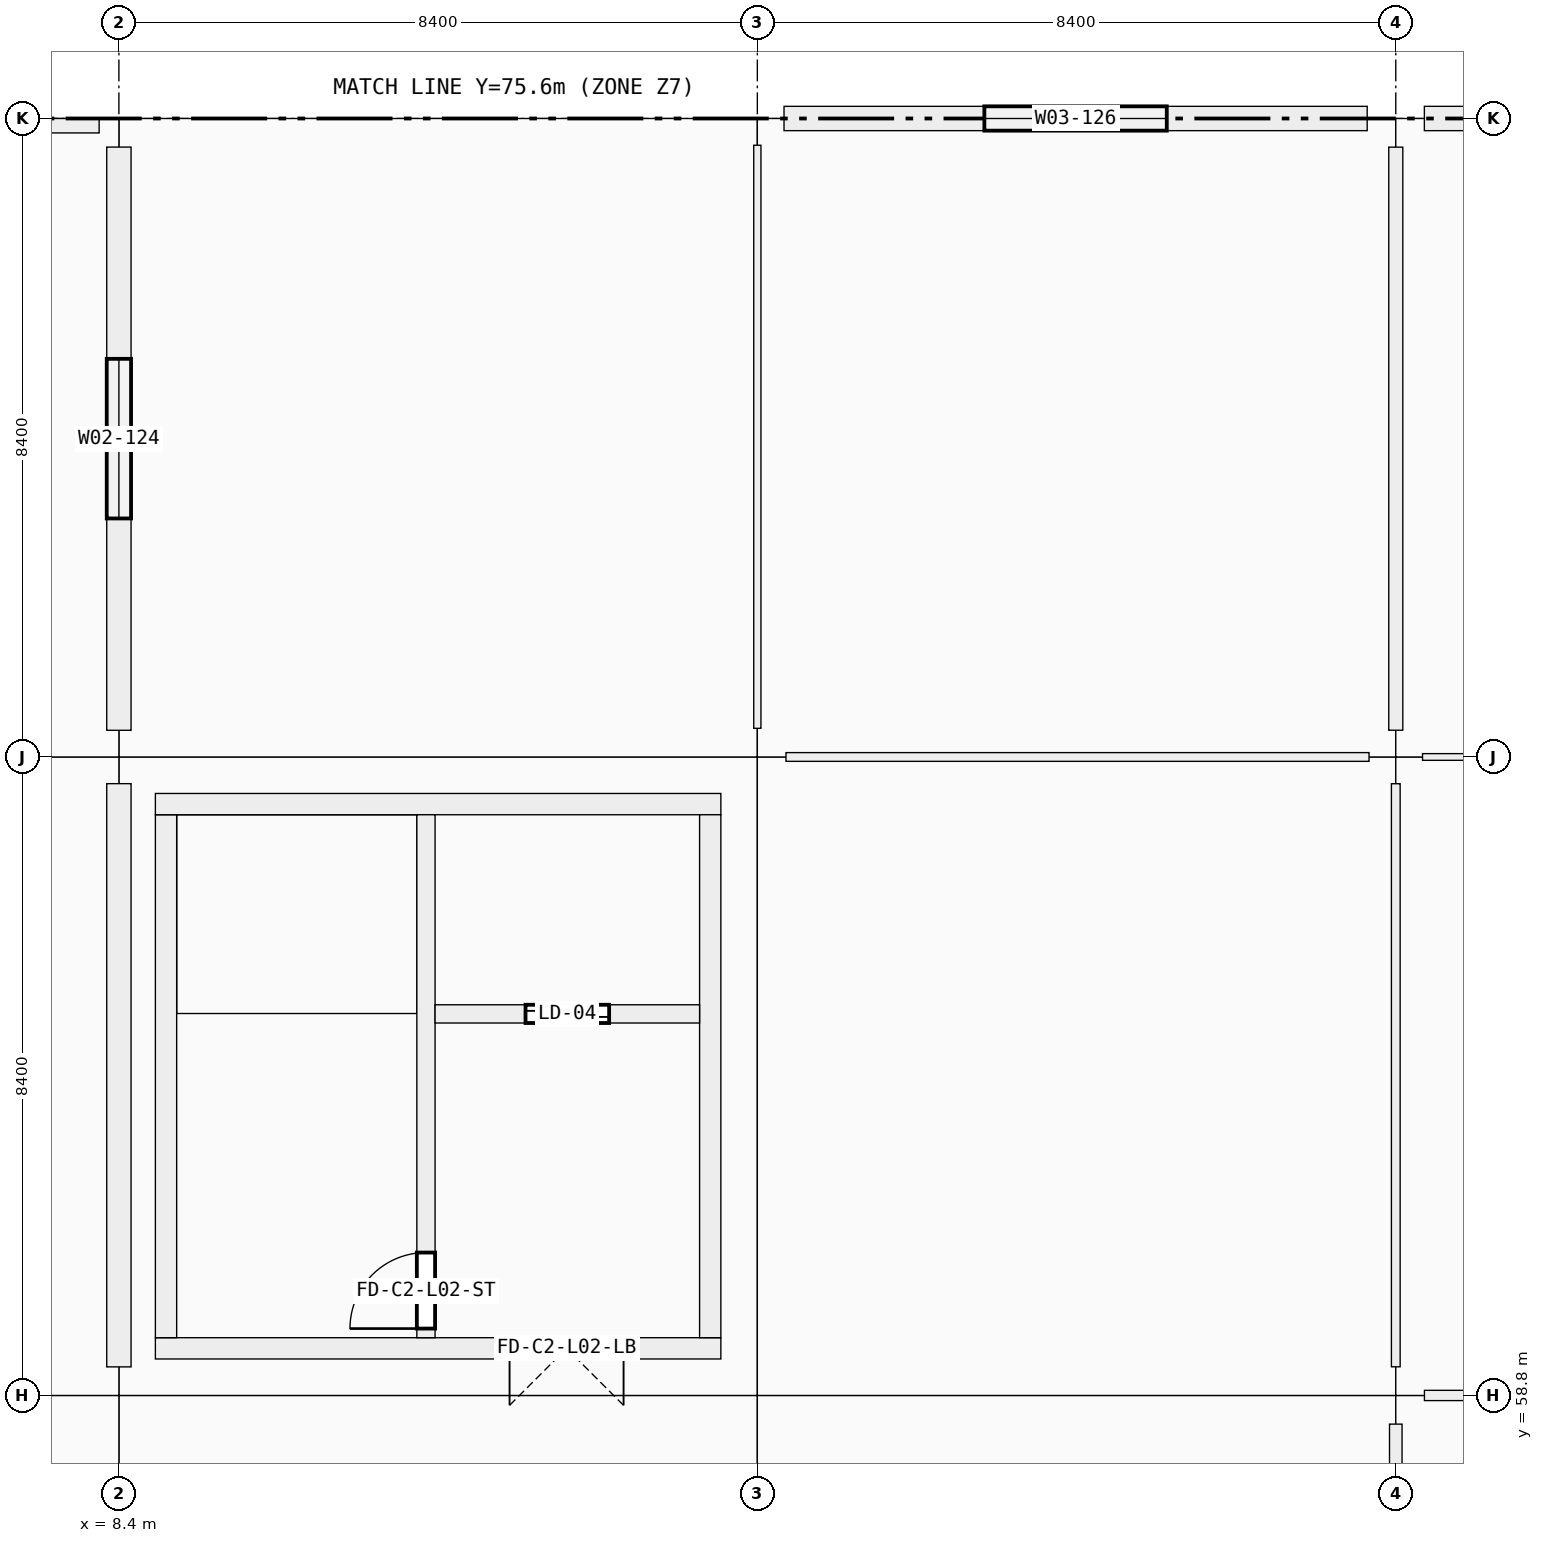
"""IFC4 building model, lengths in metres.
Left out: names, types, materials, properties, quantities, classifications, styles, units other than length and angle.
Written with IfcOpenShell. Run it as: python <this file> out.ifc"""

import sys

from ifc_helpers import new_model, si_unit, direction, frame, frame_2d, origin, origin_2d, place, context, subcontext, project, spatial, rectangle, extrude, element, fill, save


model = new_model("IFC4")
c1 = context("Model", 3, precision=1e-05, world=origin(), true_north=direction((0.0, 1.0)))
c2 = subcontext(c1, "Body", "Model", "MODEL_VIEW")
j1 = project(units=[si_unit("LENGTHUNIT", "METRE"), si_unit("PLANEANGLEUNIT", "RADIAN")], contexts=[c1])
p1 = place(None, origin())
s1 = spatial("IfcSite", under=j1, at=p1, CompositionType="ELEMENT")
p2 = place(p1, origin())
s2 = spatial("IfcBuilding", under=s1, at=p2, CompositionType="ELEMENT")
p3 = place(p2, frame((0.0, 0.0, 10.26)))
s3 = spatial("IfcBuildingStorey", under=s2, at=p3, CompositionType="ELEMENT", Elevation=10.26)
p4 = place(p3, frame((8.4, 58.8, 0.0), z_axis=(0.0, 0.0, 1.0), x_axis=(1.0, 0.0, 0.0)))
e1 = element("IfcColumn", 1, at=p4, inside=s3, PredefinedType="COLUMN", context=c2, shape_type="SweptSolid", body=[
    extrude(rectangle(XDim=0.75, YDim=0.75, at=origin_2d()), origin(), (0.0, 0.0, 1.0), 4.5),
])
p5 = place(p3, frame((8.4, 67.2, 0.0), z_axis=(0.0, 0.0, 1.0), x_axis=(1.0, 0.0, 0.0)))
e2 = element("IfcColumn", 2, at=p5, inside=s3, PredefinedType="COLUMN", context=c2, shape_type="SweptSolid", body=[
    extrude(rectangle(XDim=0.7, YDim=0.7, at=origin_2d()), origin(), (0.0, 0.0, 1.0), 4.5),
])
p6 = place(p3, frame((8.4, 75.6, 0.0), z_axis=(0.0, 0.0, 1.0), x_axis=(1.0, 0.0, 0.0)))
e3 = element("IfcColumn", 3, at=p6, inside=s3, PredefinedType="COLUMN", context=c2, shape_type="SweptSolid", body=[
    extrude(rectangle(XDim=0.75, YDim=0.75, at=origin_2d()), origin(), (0.0, 0.0, 1.0), 4.5),
])
p7 = place(p3, frame((16.8, 58.8, 0.0), z_axis=(0.0, 0.0, 1.0), x_axis=(1.0, 0.0, 0.0)))
e4 = element("IfcColumn", 4, at=p7, inside=s3, PredefinedType="COLUMN", context=c2, shape_type="SweptSolid", body=[
    extrude(rectangle(XDim=0.7, YDim=0.7, at=origin_2d()), origin(), (0.0, 0.0, 1.0), 4.5),
])
p8 = place(p3, frame((16.8, 67.2, 0.0), z_axis=(0.0, 0.0, 1.0), x_axis=(1.0, 0.0, 0.0)))
e5 = element("IfcColumn", 5, at=p8, inside=s3, PredefinedType="COLUMN", context=c2, shape_type="SweptSolid", body=[
    extrude(rectangle(XDim=0.75, YDim=0.75, at=origin_2d()), origin(), (0.0, 0.0, 1.0), 4.5),
])
p9 = place(p3, frame((16.8, 75.6, 0.0), z_axis=(0.0, 0.0, 1.0), x_axis=(1.0, 0.0, 0.0)))
e6 = element("IfcColumn", 6, at=p9, inside=s3, PredefinedType="COLUMN", context=c2, shape_type="SweptSolid", body=[
    extrude(rectangle(XDim=0.7, YDim=0.7, at=origin_2d()), origin(), (0.0, 0.0, 1.0), 4.5),
])
p10 = place(p3, frame((25.2, 58.8, 0.0), z_axis=(0.0, 0.0, 1.0), x_axis=(1.0, 0.0, 0.0)))
e7 = element("IfcColumn", 7, at=p10, inside=s3, PredefinedType="COLUMN", context=c2, shape_type="SweptSolid", body=[
    extrude(rectangle(XDim=0.75, YDim=0.75, at=origin_2d()), origin(), (0.0, 0.0, 1.0), 4.5),
])
p11 = place(p3, frame((25.2, 67.2, 0.0), z_axis=(0.0, 0.0, 1.0), x_axis=(1.0, 0.0, 0.0)))
e8 = element("IfcColumn", 8, at=p11, inside=s3, PredefinedType="COLUMN", context=c2, shape_type="SweptSolid", body=[
    extrude(rectangle(XDim=0.7, YDim=0.7, at=origin_2d()), origin(), (0.0, 0.0, 1.0), 4.5),
])
p12 = place(p3, frame((25.2, 75.6, 0.0), z_axis=(0.0, 0.0, 1.0), x_axis=(1.0, 0.0, 0.0)))
e9 = element("IfcColumn", 9, at=p12, inside=s3, PredefinedType="COLUMN", context=c2, shape_type="SweptSolid", body=[
    extrude(rectangle(XDim=0.75, YDim=0.75, at=origin_2d()), origin(), (0.0, 0.0, 1.0), 4.5),
])
p13 = place(p3, frame((8.4, 59.176, 0.0), z_axis=(0.0, 0.0, 1.0), x_axis=(0.0, 1.0, 0.0)))
e10 = element("IfcWall", 10, at=p13, inside=s3, PredefinedType="SOLIDWALL", context=c2, shape_type="SweptSolid", body=[
    extrude(rectangle(XDim=7.673, YDim=0.32, at=frame_2d((3.836, 0.0))), origin(), (0.0, 0.0, 1.0), 3.54),
])
p14 = place(p3, frame((8.4, 67.551, 0.0), z_axis=(0.0, 0.0, 1.0), x_axis=(0.0, 1.0, 0.0)))
e11 = element("IfcWall", 11, at=p14, inside=s3, PredefinedType="SOLIDWALL", context=c2, shape_type="SweptSolid", body=[
    extrude(rectangle(XDim=7.673, YDim=0.32, at=frame_2d((3.836, 0.0))), origin(), (0.0, 0.0, 1.0), 3.54),
])
p15 = place(p14, frame((2.787, 0.0, 0.9)))
e12 = element("IfcOpeningElement", 12, at=p15, cuts=e11, PredefinedType="OPENING", context=c2, shape_type="SweptSolid", body=[
    extrude(rectangle(XDim=2.1, YDim=1.8, at=frame_2d((1.05, 0.9))), frame((0.0, 0.16, 0.0), z_axis=(0.0, -1.0, 0.0), x_axis=(1.0, 0.0, 0.0)), (0.0, 0.0, 1.0), 0.32),
])
p16 = place(p3, frame((17.151, 75.6, 0.0), z_axis=(0.0, 0.0, 1.0), x_axis=(1.0, 0.0, 0.0)))
e13 = element("IfcWall", 13, at=p16, inside=s3, PredefinedType="SOLIDWALL", context=c2, shape_type="SweptSolid", body=[
    extrude(rectangle(XDim=7.673, YDim=0.32, at=frame_2d((3.836, 0.0))), origin(), (0.0, 0.0, 1.0), 3.54),
])
p17 = place(p16, frame((2.636, 0.0, 0.9)))
e14 = element("IfcOpeningElement", 14, at=p17, cuts=e13, PredefinedType="OPENING", context=c2, shape_type="SweptSolid", body=[
    extrude(rectangle(XDim=2.4, YDim=1.8, at=frame_2d((1.2, 0.9))), frame((0.0, 0.16, 0.0), z_axis=(0.0, -1.0, 0.0), x_axis=(1.0, 0.0, 0.0)), (0.0, 0.0, 1.0), 0.32),
])
p18 = place(p3, frame((25.576, 75.6, 0.0), z_axis=(0.0, 0.0, 1.0), x_axis=(1.0, 0.0, 0.0)))
e15 = element("IfcWall", 15, at=p18, inside=s3, PredefinedType="SOLIDWALL", context=c2, shape_type="SweptSolid", body=[
    extrude(rectangle(XDim=7.673, YDim=0.32, at=frame_2d((3.836, 0.0))), origin(), (0.0, 0.0, 1.0), 3.54),
])
p19 = place(p18, frame((2.337, 0.0, 0.9)))
e16 = element("IfcOpeningElement", 16, at=p19, cuts=e15, PredefinedType="OPENING", context=c2, shape_type="SweptSolid", body=[
    extrude(rectangle(XDim=3.0, YDim=1.2, at=frame_2d((1.5, 0.6))), frame((0.0, 0.16, 0.0), z_axis=(0.0, -1.0, 0.0), x_axis=(1.0, 0.0, 0.0)), (0.0, 0.0, 1.0), 0.32),
])
p20 = place(p3, frame((0.26, 75.505, 0.0), z_axis=(0.0, 0.0, 1.0), x_axis=(1.0, 0.0, 0.0)))
e17 = element("IfcWall", 17, at=p20, inside=s3, PredefinedType="PARAPET", context=c2, shape_type="SweptSolid", body=[
    extrude(rectangle(XDim=7.88, YDim=0.19, at=frame_2d((3.94, 0.0))), origin(), (0.0, 0.0, 1.0), 0.95),
])
p21 = place(p3, frame((16.32, 59.42, 0.0), z_axis=(0.0, 0.0, 1.0), x_axis=(-1.0, 0.0, 0.0)))
e18 = element("IfcWall", 18, at=p21, inside=s3, PredefinedType="SHEAR", context=c2, shape_type="SweptSolid", body=[
    extrude(rectangle(XDim=7.44, YDim=0.28, at=frame_2d((3.72, 0.0))), origin(), (0.0, 0.0, 1.0), 4.5),
])
p22 = place(p21, frame((1.28, 0.0, 0.0)))
e19 = element("IfcOpeningElement", 19, at=p22, cuts=e18, PredefinedType="OPENING", context=c2, shape_type="SweptSolid", body=[
    extrude(rectangle(XDim=1.5, YDim=2.15, at=frame_2d((0.75, 1.075))), frame((0.0, 0.14, 0.0), z_axis=(0.0, -1.0, 0.0), x_axis=(1.0, 0.0, 0.0)), (0.0, 0.0, 1.0), 0.28),
])
p23 = place(p3, frame((9.02, 59.56, 0.0), z_axis=(0.0, 0.0, 1.0), x_axis=(0.0, 1.0, 0.0)))
e20 = element("IfcWall", 20, at=p23, inside=s3, PredefinedType="SHEAR", context=c2, shape_type="SweptSolid", body=[
    extrude(rectangle(XDim=6.88, YDim=0.28, at=frame_2d((3.44, 0.0))), origin(), (0.0, 0.0, 1.0), 4.5),
])
p24 = place(p3, frame((8.88, 66.58, 0.0), z_axis=(0.0, 0.0, 1.0), x_axis=(1.0, 0.0, 0.0)))
e21 = element("IfcWall", 21, at=p24, inside=s3, PredefinedType="SHEAR", context=c2, shape_type="SweptSolid", body=[
    extrude(rectangle(XDim=7.44, YDim=0.28, at=frame_2d((3.72, 0.0))), origin(), (0.0, 0.0, 1.0), 4.5),
])
p25 = place(p3, frame((16.18, 66.44, 0.0), z_axis=(0.0, 0.0, 1.0), x_axis=(0.0, -1.0, 0.0)))
e22 = element("IfcWall", 22, at=p25, inside=s3, PredefinedType="SHEAR", context=c2, shape_type="SweptSolid", body=[
    extrude(rectangle(XDim=6.88, YDim=0.28, at=frame_2d((3.44, 0.0))), origin(), (0.0, 0.0, 1.0), 4.5),
])
p26 = place(p3, frame((12.44, 59.56, 0.0), z_axis=(0.0, 0.0, 1.0), x_axis=(0.0, 1.0, 0.0)))
e23 = element("IfcWall", 23, at=p26, inside=s3, PredefinedType="SHEAR", context=c2, shape_type="SweptSolid", body=[
    extrude(rectangle(XDim=6.88, YDim=0.24, at=frame_2d((3.44, 0.0))), origin(), (0.0, 0.0, 1.0), 4.5),
])
p27 = place(p26, frame((0.12, 0.0, 0.0)))
e24 = element("IfcOpeningElement", 24, at=p27, cuts=e23, PredefinedType="OPENING", context=c2, shape_type="SweptSolid", body=[
    extrude(rectangle(XDim=1.0, YDim=2.15, at=frame_2d((0.5, 1.075))), frame((0.0, 0.12, 0.0), z_axis=(0.0, -1.0, 0.0), x_axis=(1.0, 0.0, 0.0)), (0.0, 0.0, 1.0), 0.24),
])
p28 = place(p3, frame((12.56, 63.82, 0.0), z_axis=(0.0, 0.0, 1.0), x_axis=(1.0, 0.0, 0.0)))
e25 = element("IfcWall", 25, at=p28, inside=s3, PredefinedType="SHEAR", context=c2, shape_type="SweptSolid", body=[
    extrude(rectangle(XDim=3.48, YDim=0.24, at=frame_2d((1.74, 0.0))), origin(), (0.0, 0.0, 1.0), 4.5),
])
p29 = place(p28, frame((1.19, 0.0, 0.0)))
e26 = element("IfcOpeningElement", 26, at=p29, cuts=e25, PredefinedType="OPENING", context=c2, shape_type="SweptSolid", body=[
    extrude(rectangle(XDim=1.1, YDim=2.15, at=frame_2d((0.55, 1.075))), frame((0.0, 0.12, 0.0), z_axis=(0.0, -1.0, 0.0), x_axis=(1.0, 0.0, 0.0)), (0.0, 0.0, 1.0), 0.24),
])
p30 = place(p3, frame((17.177, 67.2, 0.0), z_axis=(0.0, 0.0, 1.0), x_axis=(1.0, 0.0, 0.0)))
e27 = element("IfcWall", 27, at=p30, inside=s3, PredefinedType="PARTITIONING", context=c2, shape_type="SweptSolid", body=[
    extrude(rectangle(XDim=7.671, YDim=0.115, at=frame_2d((3.835, 0.0))), origin(), (0.0, 0.0, 1.0), 3.37),
])
p31 = place(p30, frame((3.316, 0.0, 0.0)))
e28 = element("IfcOpeningElement", 28, at=p31, cuts=e27, PredefinedType="OPENING", context=c2, shape_type="SweptSolid", body=[
    extrude(rectangle(XDim=1.04, YDim=2.2, at=frame_2d((0.52, 1.1))), frame((0.0, 0.058, 0.0), z_axis=(0.0, -1.0, 0.0), x_axis=(1.0, 0.0, 0.0)), (0.0, 0.0, 1.0), 0.115),
])
p32 = place(p3, frame((25.577, 58.8, 0.0), z_axis=(0.0, 0.0, 1.0), x_axis=(1.0, 0.0, 0.0)))
e29 = element("IfcWall", 29, at=p32, inside=s3, PredefinedType="PARTITIONING", context=c2, shape_type="SweptSolid", body=[
    extrude(rectangle(XDim=7.671, YDim=0.135, at=frame_2d((3.835, 0.0))), origin(), (0.0, 0.0, 1.0), 3.37),
])
p33 = place(p32, frame((3.306, 0.0, 0.0)))
e30 = element("IfcOpeningElement", 30, at=p33, cuts=e29, PredefinedType="OPENING", context=c2, shape_type="SweptSolid", body=[
    extrude(rectangle(XDim=1.06, YDim=2.25, at=frame_2d((0.53, 1.125))), frame((0.0, 0.067, 0.0), z_axis=(0.0, -1.0, 0.0), x_axis=(1.0, 0.0, 0.0)), (0.0, 0.0, 1.0), 0.135),
])
p34 = place(p3, frame((25.552, 67.2, 0.0), z_axis=(0.0, 0.0, 1.0), x_axis=(1.0, 0.0, 0.0)))
e31 = element("IfcWall", 31, at=p34, inside=s3, PredefinedType="PARTITIONING", context=c2, shape_type="SweptSolid", body=[
    extrude(rectangle(XDim=7.671, YDim=0.088, at=frame_2d((3.835, 0.0))), origin(), (0.0, 0.0, 1.0), 3.37),
])
p35 = place(p34, frame((3.316, 0.0, 0.0)))
e32 = element("IfcOpeningElement", 32, at=p35, cuts=e31, PredefinedType="OPENING", context=c2, shape_type="SweptSolid", body=[
    extrude(rectangle(XDim=1.04, YDim=2.2, at=frame_2d((0.52, 1.1))), frame((0.0, 0.044, 0.0), z_axis=(0.0, -1.0, 0.0), x_axis=(1.0, 0.0, 0.0)), (0.0, 0.0, 1.0), 0.088),
])
p36 = place(p3, frame((16.8, 67.577, 0.0), z_axis=(0.0, 0.0, 1.0), x_axis=(0.0, 1.0, 0.0)))
e33 = element("IfcWall", 33, at=p36, inside=s3, PredefinedType="PARTITIONING", context=c2, shape_type="SweptSolid", body=[
    extrude(rectangle(XDim=7.671, YDim=0.095, at=frame_2d((3.835, 0.0))), origin(), (0.0, 0.0, 1.0), 3.37),
])
p37 = place(p36, frame((3.311, 0.0, 0.0)))
e34 = element("IfcOpeningElement", 34, at=p37, cuts=e33, PredefinedType="OPENING", context=c2, shape_type="SweptSolid", body=[
    extrude(rectangle(XDim=1.05, YDim=2.12, at=frame_2d((0.525, 1.06))), frame((0.0, 0.047, 0.0), z_axis=(0.0, -1.0, 0.0), x_axis=(1.0, 0.0, 0.0)), (0.0, 0.0, 1.0), 0.095),
])
p38 = place(p3, frame((25.2, 50.752, 0.0), z_axis=(0.0, 0.0, 1.0), x_axis=(0.0, 1.0, 0.0)))
e35 = element("IfcWall", 35, at=p38, inside=s3, PredefinedType="PARTITIONING", context=c2, shape_type="SweptSolid", body=[
    extrude(rectangle(XDim=7.671, YDim=0.165, at=frame_2d((3.835, 0.0))), origin(), (0.0, 0.0, 1.0), 3.37),
])
p39 = place(p38, frame((3.306, 0.0, 0.0)))
e36 = element("IfcOpeningElement", 36, at=p39, cuts=e35, PredefinedType="OPENING", context=c2, shape_type="SweptSolid", body=[
    extrude(rectangle(XDim=1.06, YDim=2.25, at=frame_2d((0.53, 1.125))), frame((0.0, 0.083, 0.0), z_axis=(0.0, -1.0, 0.0), x_axis=(1.0, 0.0, 0.0)), (0.0, 0.0, 1.0), 0.165),
])
p40 = place(p3, frame((25.2, 59.177, 0.0), z_axis=(0.0, 0.0, 1.0), x_axis=(0.0, 1.0, 0.0)))
e37 = element("IfcWall", 37, at=p40, inside=s3, PredefinedType="PARTITIONING", context=c2, shape_type="SweptSolid", body=[
    extrude(rectangle(XDim=7.671, YDim=0.115, at=frame_2d((3.835, 0.0))), origin(), (0.0, 0.0, 1.0), 3.37),
])
p41 = place(p40, frame((3.316, 0.0, 0.0)))
e38 = element("IfcOpeningElement", 38, at=p41, cuts=e37, PredefinedType="OPENING", context=c2, shape_type="SweptSolid", body=[
    extrude(rectangle(XDim=1.04, YDim=2.2, at=frame_2d((0.52, 1.1))), frame((0.0, 0.058, 0.0), z_axis=(0.0, -1.0, 0.0), x_axis=(1.0, 0.0, 0.0)), (0.0, 0.0, 1.0), 0.115),
])
p42 = place(p3, frame((25.2, 67.552, 0.0), z_axis=(0.0, 0.0, 1.0), x_axis=(0.0, 1.0, 0.0)))
e39 = element("IfcWall", 39, at=p42, inside=s3, PredefinedType="PARTITIONING", context=c2, shape_type="SweptSolid", body=[
    extrude(rectangle(XDim=7.671, YDim=0.185, at=frame_2d((3.835, 0.0))), origin(), (0.0, 0.0, 1.0), 3.37),
])
p43 = place(p42, frame((3.356, 0.0, 0.0)))
e40 = element("IfcOpeningElement", 40, at=p43, cuts=e39, PredefinedType="OPENING", context=c2, shape_type="SweptSolid", body=[
    extrude(rectangle(XDim=0.96, YDim=2.18, at=frame_2d((0.48, 1.09))), frame((0.0, 0.093, 0.0), z_axis=(0.0, -1.0, 0.0), x_axis=(1.0, 0.0, 0.0)), (0.0, 0.0, 1.0), 0.185),
])
p44 = place(p15, origin())
e41 = element("IfcWindow", 41, at=p44, inside=s3, PartitioningType="SINGLE_PANEL", PredefinedType="WINDOW", context=c2, shape_type="SweptSolid", body=[
    extrude(rectangle(XDim=2.1, YDim=1.8, at=frame_2d((1.05, 0.9))), frame((0.0, 0.03, 0.0), z_axis=(0.0, -1.0, 0.0), x_axis=(1.0, 0.0, 0.0)), (0.0, 0.0, 1.0), 0.06),
])
fill(e12, e41)
p45 = place(p17, origin())
e42 = element("IfcWindow", 42, at=p45, inside=s3, PartitioningType="SINGLE_PANEL", PredefinedType="WINDOW", context=c2, shape_type="SweptSolid", body=[
    extrude(rectangle(XDim=2.4, YDim=1.8, at=frame_2d((1.2, 0.9))), frame((0.0, 0.03, 0.0), z_axis=(0.0, -1.0, 0.0), x_axis=(1.0, 0.0, 0.0)), (0.0, 0.0, 1.0), 0.06),
])
fill(e14, e42)
p46 = place(p27, origin())
e43 = element("IfcDoor", 43, at=p46, inside=s3, OperationType="SINGLE_SWING_LEFT", PredefinedType="DOOR", context=c2, shape_type="SweptSolid", body=[
    extrude(rectangle(XDim=1.0, YDim=2.15, at=frame_2d((0.5, 1.075))), frame((0.0, 0.025, 0.0), z_axis=(0.0, -1.0, 0.0), x_axis=(1.0, 0.0, 0.0)), (0.0, 0.0, 1.0), 0.05),
])
fill(e24, e43)
p47 = place(p22, origin())
e44 = element("IfcDoor", 44, at=p47, inside=s3, OperationType="DOUBLE_DOOR_SINGLE_SWING", PredefinedType="DOOR", context=c2, shape_type="SweptSolid", body=[
    extrude(rectangle(XDim=1.5, YDim=2.15, at=frame_2d((0.75, 1.075))), frame((0.0, 0.025, 0.0), z_axis=(0.0, -1.0, 0.0), x_axis=(1.0, 0.0, 0.0)), (0.0, 0.0, 1.0), 0.05),
])
fill(e19, e44)
p48 = place(p29, origin())
e45 = element("IfcDoor", 45, at=p48, inside=s3, OperationType="DOUBLE_DOOR_SLIDING", PredefinedType="DOOR", context=c2, shape_type="SweptSolid", body=[
    extrude(rectangle(XDim=1.1, YDim=2.15, at=frame_2d((0.55, 1.075))), frame((0.0, 0.025, 0.0), z_axis=(0.0, -1.0, 0.0), x_axis=(1.0, 0.0, 0.0)), (0.0, 0.0, 1.0), 0.05),
])
fill(e26, e45)
p49 = place(p31, origin())
e46 = element("IfcDoor", 46, at=p49, inside=s3, OperationType="SINGLE_SWING_LEFT", PredefinedType="DOOR", context=c2, shape_type="SweptSolid", body=[
    extrude(rectangle(XDim=1.04, YDim=2.2, at=frame_2d((0.52, 1.1))), frame((0.0, 0.025, 0.0), z_axis=(0.0, -1.0, 0.0), x_axis=(1.0, 0.0, 0.0)), (0.0, 0.0, 1.0), 0.05),
])
fill(e28, e46)
p50 = place(p41, origin())
e47 = element("IfcDoor", 47, at=p50, inside=s3, OperationType="SINGLE_SWING_RIGHT", PredefinedType="DOOR", context=c2, shape_type="SweptSolid", body=[
    extrude(rectangle(XDim=1.04, YDim=2.2, at=frame_2d((0.52, 1.1))), frame((0.0, 0.025, 0.0), z_axis=(0.0, -1.0, 0.0), x_axis=(1.0, 0.0, 0.0)), (0.0, 0.0, 1.0), 0.05),
])
fill(e38, e47)
p51 = place(p37, origin())
e48 = element("IfcDoor", 48, at=p51, inside=s3, OperationType="SINGLE_SWING_LEFT", PredefinedType="DOOR", context=c2, shape_type="SweptSolid", body=[
    extrude(rectangle(XDim=1.05, YDim=2.12, at=frame_2d((0.525, 1.06))), frame((0.0, 0.025, 0.0), z_axis=(0.0, -1.0, 0.0), x_axis=(1.0, 0.0, 0.0)), (0.0, 0.0, 1.0), 0.05),
])
fill(e34, e48)
p52 = place(p43, origin())
e49 = element("IfcDoor", 49, at=p52, inside=s3, OperationType="SINGLE_SWING_RIGHT", PredefinedType="DOOR", context=c2, shape_type="SweptSolid", body=[
    extrude(rectangle(XDim=0.96, YDim=2.18, at=frame_2d((0.48, 1.09))), frame((0.0, 0.025, 0.0), z_axis=(0.0, -1.0, 0.0), x_axis=(1.0, 0.0, 0.0)), (0.0, 0.0, 1.0), 0.05),
])
fill(e40, e49)
save(model, sys.argv[1])
